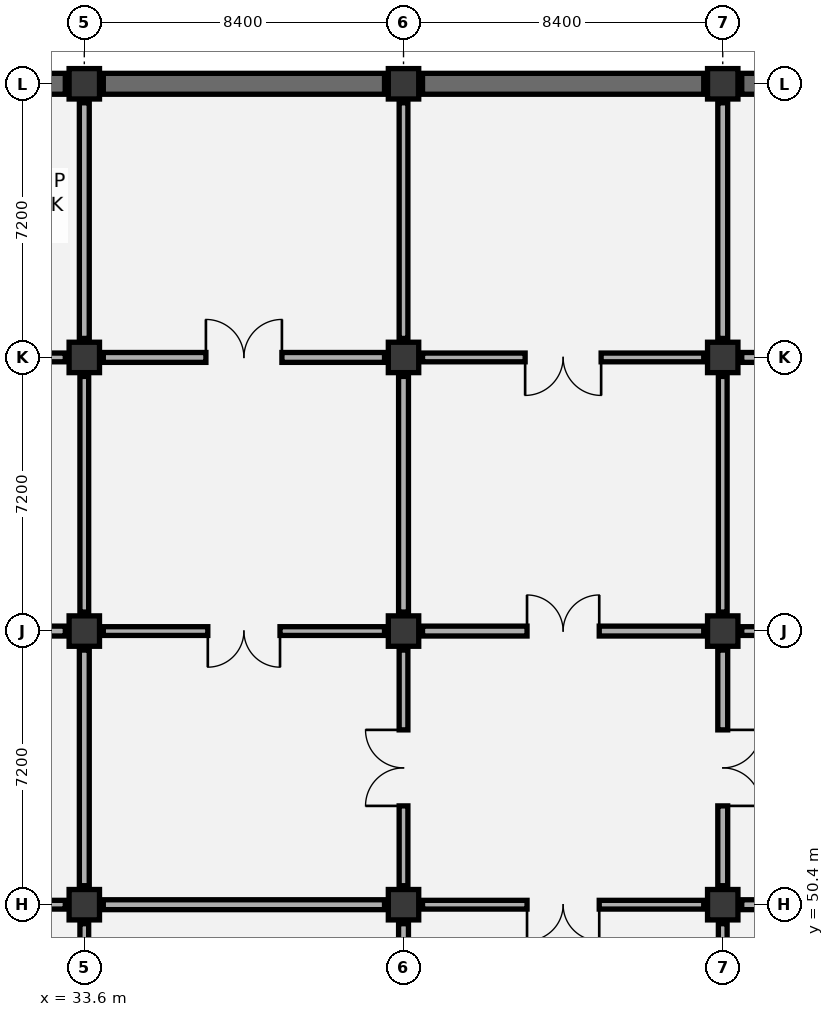
"""IFC4 building model, lengths in metres.
Left out: names, types, materials, properties, quantities, classifications, styles, units other than length and angle.
Written with IfcOpenShell. Run it as: python <this file> out.ifc"""

import sys

from ifc_helpers import new_model, si_unit, direction, frame, frame_2d, origin, origin_2d, place, context, subcontext, project, spatial, rectangle, extrude, element, fill, save


model = new_model("IFC4")
c1 = context("Model", 3, precision=1e-05, world=origin(), true_north=direction((0.0, 1.0)))
c2 = subcontext(c1, "Body", "Model", "MODEL_VIEW")
j1 = project(units=[si_unit("LENGTHUNIT", "METRE"), si_unit("PLANEANGLEUNIT", "RADIAN")], contexts=[c1])
p1 = place(None, origin())
s1 = spatial("IfcSite", under=j1, at=p1, CompositionType="ELEMENT")
p2 = place(p1, origin())
s2 = spatial("IfcBuilding", under=s1, at=p2, CompositionType="ELEMENT")
p3 = place(p2, frame((0.0, 0.0, -9.6)))
s3 = spatial("IfcBuildingStorey", under=s2, at=p3, CompositionType="ELEMENT", Elevation=-9.6)
for number, where, z_axis, x_axis in (
    (1, (33.6, 50.4, 0.0), (0.0, 0.0, 1.0), (1.0, 0.0, 0.0)),
    (2, (33.6, 57.6, 0.0), (0.0, 0.0, 1.0), (1.0, 0.0, 0.0)),
    (3, (33.6, 64.8, 0.0), (0.0, 0.0, 1.0), (1.0, 0.0, 0.0)),
    (4, (33.6, 72.0, 0.0), (0.0, 0.0, 1.0), (1.0, 0.0, 0.0)),
    (5, (42.0, 50.4, 0.0), (0.0, 0.0, 1.0), (1.0, 0.0, 0.0)),
    (6, (42.0, 57.6, 0.0), (0.0, 0.0, 1.0), (1.0, 0.0, 0.0)),
    (7, (42.0, 64.8, 0.0), (0.0, 0.0, 1.0), (1.0, 0.0, 0.0)),
    (8, (42.0, 72.0, 0.0), (0.0, 0.0, 1.0), (1.0, 0.0, 0.0)),
    (9, (50.4, 50.4, 0.0), (0.0, 0.0, 1.0), (1.0, 0.0, 0.0)),
    (10, (50.4, 57.6, 0.0), (0.0, 0.0, 1.0), (1.0, 0.0, 0.0)),
    (11, (50.4, 64.8, 0.0), (0.0, 0.0, 1.0), (1.0, 0.0, 0.0)),
    (12, (50.4, 72.0, 0.0), (0.0, 0.0, 1.0), (1.0, 0.0, 0.0)),
):
    element("IfcColumn", number, at=place(p3, frame(where, z_axis=z_axis, x_axis=x_axis)), inside=s3, PredefinedType="COLUMN", context=c2, shape_type="SweptSolid", body=[
        extrude(rectangle(XDim=0.8, YDim=0.8, at=origin_2d()), origin(), (0.0, 0.0, 1.0), 4.8),
    ])
p4 = place(p3, frame((25.7, 72.0, 0.0), z_axis=(0.0, 0.0, 1.0), x_axis=(1.0, 0.0, 0.0)))
e13 = element("IfcWall", 13, at=p4, inside=s3, PredefinedType="USERDEFINED", context=c2, shape_type="SweptSolid", body=[
    extrude(rectangle(XDim=7.4, YDim=0.55, at=frame_2d((3.7, 0.0))), origin(), (0.0, 0.0, 1.0), 4.4),
])
for number, where, z_axis, x_axis in (
    (14, (34.1, 72.0, 0.0), (0.0, 0.0, 1.0), (1.0, 0.0, 0.0)),
    (15, (42.5, 72.0, 0.0), (0.0, 0.0, 1.0), (1.0, 0.0, 0.0)),
):
    element("IfcWall", number, at=place(p3, frame(where, z_axis=z_axis, x_axis=x_axis)), inside=s3, PredefinedType="USERDEFINED", context=c2, shape_type="SweptSolid", body=[
        extrude(rectangle(XDim=7.4, YDim=0.55, at=frame_2d((3.7, 0.0))), origin(), (0.0, 0.0, 1.0), 4.4),
    ])
p5 = place(p3, frame((50.9, 72.0, 0.0), z_axis=(0.0, 0.0, 1.0), x_axis=(1.0, 0.0, 0.0)))
e16 = element("IfcWall", 16, at=p5, inside=s3, PredefinedType="USERDEFINED", context=c2, shape_type="SweptSolid", body=[
    extrude(rectangle(XDim=7.4, YDim=0.55, at=frame_2d((3.7, 0.0))), origin(), (0.0, 0.0, 1.0), 4.4),
])
p6 = place(p3, frame((33.6, 43.7, 0.0), z_axis=(0.0, 0.0, 1.0), x_axis=(0.0, 1.0, 0.0)))
e17 = element("IfcWall", 17, at=p6, inside=s3, PredefinedType="PARTITIONING", context=c2, shape_type="SweptSolid", body=[
    extrude(rectangle(XDim=6.2, YDim=0.23, at=frame_2d((3.1, 0.0))), origin(), (0.0, 0.0, 1.0), 3.595),
])
p7 = place(p3, frame((25.7, 50.4, 0.0), z_axis=(0.0, 0.0, 1.0), x_axis=(1.0, 0.0, 0.0)))
e18 = element("IfcWall", 18, at=p7, inside=s3, PredefinedType="PARTITIONING", context=c2, shape_type="SweptSolid", body=[
    extrude(rectangle(XDim=7.4, YDim=0.23, at=frame_2d((3.7, 0.0))), origin(), (0.0, 0.0, 1.0), 3.495),
])
p8 = place(p7, frame((2.7, 0.0, 0.0)))
e19 = element("IfcOpeningElement", 19, at=p8, cuts=e18, PredefinedType="OPENING", context=c2, shape_type="SweptSolid", body=[
    extrude(rectangle(XDim=2.0, YDim=2.35, at=frame_2d((1.0, 1.175))), frame((0.0, 0.125, 0.0), z_axis=(0.0, -1.0, 0.0), x_axis=(1.0, 0.0, 0.0)), (0.0, 0.0, 1.0), 0.25),
])
p9 = place(p3, frame((33.6, 50.9, 0.0), z_axis=(0.0, 0.0, 1.0), x_axis=(0.0, 1.0, 0.0)))
e20 = element("IfcWall", 20, at=p9, inside=s3, PredefinedType="PARTITIONING", context=c2, shape_type="SweptSolid", body=[
    extrude(rectangle(XDim=6.2, YDim=0.26, at=frame_2d((3.1, 0.0))), origin(), (0.0, 0.0, 1.0), 3.595),
])
p10 = place(p3, frame((25.7, 57.6, 0.0), z_axis=(0.0, 0.0, 1.0), x_axis=(1.0, 0.0, 0.0)))
e21 = element("IfcWall", 21, at=p10, inside=s3, PredefinedType="PARTITIONING", context=c2, shape_type="SweptSolid", body=[
    extrude(rectangle(XDim=7.4, YDim=0.26, at=frame_2d((3.7, 0.0))), origin(), (0.0, 0.0, 1.0), 3.495),
])
p11 = place(p10, frame((2.75, 0.0, 0.0)))
e22 = element("IfcOpeningElement", 22, at=p11, cuts=e21, PredefinedType="OPENING", context=c2, shape_type="SweptSolid", body=[
    extrude(rectangle(XDim=1.9, YDim=2.3, at=frame_2d((0.95, 1.15))), frame((0.0, 0.14, 0.0), z_axis=(0.0, -1.0, 0.0), x_axis=(1.0, 0.0, 0.0)), (0.0, 0.0, 1.0), 0.28),
])
p12 = place(p3, frame((33.6, 58.1, 0.0), z_axis=(0.0, 0.0, 1.0), x_axis=(0.0, 1.0, 0.0)))
e23 = element("IfcWall", 23, at=p12, inside=s3, PredefinedType="PARTITIONING", context=c2, shape_type="SweptSolid", body=[
    extrude(rectangle(XDim=6.2, YDim=0.23, at=frame_2d((3.1, 0.0))), origin(), (0.0, 0.0, 1.0), 3.595),
])
p13 = place(p3, frame((25.7, 64.8, 0.0), z_axis=(0.0, 0.0, 1.0), x_axis=(1.0, 0.0, 0.0)))
e24 = element("IfcWall", 24, at=p13, inside=s3, PredefinedType="PARTITIONING", context=c2, shape_type="SweptSolid", body=[
    extrude(rectangle(XDim=7.4, YDim=0.23, at=frame_2d((3.7, 0.0))), origin(), (0.0, 0.0, 1.0), 3.495),
])
p14 = place(p13, frame((2.7, 0.0, 0.0)))
e25 = element("IfcOpeningElement", 25, at=p14, cuts=e24, PredefinedType="OPENING", context=c2, shape_type="SweptSolid", body=[
    extrude(rectangle(XDim=2.0, YDim=2.35, at=frame_2d((1.0, 1.175))), frame((0.0, 0.125, 0.0), z_axis=(0.0, -1.0, 0.0), x_axis=(1.0, 0.0, 0.0)), (0.0, 0.0, 1.0), 0.25),
])
for number, where, z_axis, x_axis in (
    (26, (33.6, 65.3, 0.0), (0.0, 0.0, 1.0), (0.0, 1.0, 0.0)),
    (27, (42.0, 43.7, 0.0), (0.0, 0.0, 1.0), (0.0, 1.0, 0.0)),
):
    element("IfcWall", number, at=place(p3, frame(where, z_axis=z_axis, x_axis=x_axis)), inside=s3, PredefinedType="PARTITIONING", context=c2, shape_type="SweptSolid", body=[
        extrude(rectangle(XDim=6.2, YDim=0.26, at=frame_2d((3.1, 0.0))), origin(), (0.0, 0.0, 1.0), 3.595),
    ])
p15 = place(p3, frame((34.1, 50.4, 0.0), z_axis=(0.0, 0.0, 1.0), x_axis=(1.0, 0.0, 0.0)))
e28 = element("IfcWall", 28, at=p15, inside=s3, PredefinedType="PARTITIONING", context=c2, shape_type="SweptSolid", body=[
    extrude(rectangle(XDim=7.4, YDim=0.26, at=frame_2d((3.7, 0.0))), origin(), (0.0, 0.0, 1.0), 3.495),
])
p16 = place(p3, frame((42.0, 50.9, 0.0), z_axis=(0.0, 0.0, 1.0), x_axis=(0.0, 1.0, 0.0)))
e29 = element("IfcWall", 29, at=p16, inside=s3, PredefinedType="PARTITIONING", context=c2, shape_type="SweptSolid", body=[
    extrude(rectangle(XDim=6.2, YDim=0.23, at=frame_2d((3.1, 0.0))), origin(), (0.0, 0.0, 1.0), 3.595),
])
p17 = place(p16, frame((2.1, 0.0, 0.0)))
e30 = element("IfcOpeningElement", 30, at=p17, cuts=e29, PredefinedType="OPENING", context=c2, shape_type="SweptSolid", body=[
    extrude(rectangle(XDim=2.0, YDim=2.35, at=frame_2d((1.0, 1.175))), frame((0.0, 0.125, 0.0), z_axis=(0.0, -1.0, 0.0), x_axis=(1.0, 0.0, 0.0)), (0.0, 0.0, 1.0), 0.25),
])
p18 = place(p3, frame((34.1, 57.6, 0.0), z_axis=(0.0, 0.0, 1.0), x_axis=(1.0, 0.0, 0.0)))
e31 = element("IfcWall", 31, at=p18, inside=s3, PredefinedType="PARTITIONING", context=c2, shape_type="SweptSolid", body=[
    extrude(rectangle(XDim=7.4, YDim=0.23, at=frame_2d((3.7, 0.0))), origin(), (0.0, 0.0, 1.0), 3.495),
])
p19 = place(p18, frame((2.75, 0.0, 0.0)))
e32 = element("IfcOpeningElement", 32, at=p19, cuts=e31, PredefinedType="OPENING", context=c2, shape_type="SweptSolid", body=[
    extrude(rectangle(XDim=1.9, YDim=2.3, at=frame_2d((0.95, 1.15))), frame((0.0, 0.125, 0.0), z_axis=(0.0, -1.0, 0.0), x_axis=(1.0, 0.0, 0.0)), (0.0, 0.0, 1.0), 0.25),
])
p20 = place(p3, frame((42.0, 58.1, 0.0), z_axis=(0.0, 0.0, 1.0), x_axis=(0.0, 1.0, 0.0)))
e33 = element("IfcWall", 33, at=p20, inside=s3, PredefinedType="PARTITIONING", context=c2, shape_type="SweptSolid", body=[
    extrude(rectangle(XDim=6.2, YDim=0.26, at=frame_2d((3.1, 0.0))), origin(), (0.0, 0.0, 1.0), 3.595),
])
p21 = place(p3, frame((34.1, 64.8, 0.0), z_axis=(0.0, 0.0, 1.0), x_axis=(1.0, 0.0, 0.0)))
e34 = element("IfcWall", 34, at=p21, inside=s3, PredefinedType="PARTITIONING", context=c2, shape_type="SweptSolid", body=[
    extrude(rectangle(XDim=7.4, YDim=0.26, at=frame_2d((3.7, 0.0))), origin(), (0.0, 0.0, 1.0), 3.495),
])
p22 = place(p21, frame((2.7, 0.0, 0.0)))
e35 = element("IfcOpeningElement", 35, at=p22, cuts=e34, PredefinedType="OPENING", context=c2, shape_type="SweptSolid", body=[
    extrude(rectangle(XDim=2.0, YDim=2.35, at=frame_2d((1.0, 1.175))), frame((0.0, 0.14, 0.0), z_axis=(0.0, -1.0, 0.0), x_axis=(1.0, 0.0, 0.0)), (0.0, 0.0, 1.0), 0.28),
])
for number, where, z_axis, x_axis in (
    (36, (42.0, 65.3, 0.0), (0.0, 0.0, 1.0), (0.0, 1.0, 0.0)),
    (37, (50.4, 43.7, 0.0), (0.0, 0.0, 1.0), (0.0, 1.0, 0.0)),
):
    element("IfcWall", number, at=place(p3, frame(where, z_axis=z_axis, x_axis=x_axis)), inside=s3, PredefinedType="PARTITIONING", context=c2, shape_type="SweptSolid", body=[
        extrude(rectangle(XDim=6.2, YDim=0.23, at=frame_2d((3.1, 0.0))), origin(), (0.0, 0.0, 1.0), 3.595),
    ])
p23 = place(p3, frame((42.5, 50.4, 0.0), z_axis=(0.0, 0.0, 1.0), x_axis=(1.0, 0.0, 0.0)))
e38 = element("IfcWall", 38, at=p23, inside=s3, PredefinedType="PARTITIONING", context=c2, shape_type="SweptSolid", body=[
    extrude(rectangle(XDim=7.4, YDim=0.23, at=frame_2d((3.7, 0.0))), origin(), (0.0, 0.0, 1.0), 3.495),
])
p24 = place(p23, frame((2.75, 0.0, 0.0)))
e39 = element("IfcOpeningElement", 39, at=p24, cuts=e38, PredefinedType="OPENING", context=c2, shape_type="SweptSolid", body=[
    extrude(rectangle(XDim=1.9, YDim=2.3, at=frame_2d((0.95, 1.15))), frame((0.0, 0.125, 0.0), z_axis=(0.0, -1.0, 0.0), x_axis=(1.0, 0.0, 0.0)), (0.0, 0.0, 1.0), 0.25),
])
p25 = place(p3, frame((50.4, 50.9, 0.0), z_axis=(0.0, 0.0, 1.0), x_axis=(0.0, 1.0, 0.0)))
e40 = element("IfcWall", 40, at=p25, inside=s3, PredefinedType="PARTITIONING", context=c2, shape_type="SweptSolid", body=[
    extrude(rectangle(XDim=6.2, YDim=0.26, at=frame_2d((3.1, 0.0))), origin(), (0.0, 0.0, 1.0), 3.595),
])
p26 = place(p25, frame((2.1, 0.0, 0.0)))
e41 = element("IfcOpeningElement", 41, at=p26, cuts=e40, PredefinedType="OPENING", context=c2, shape_type="SweptSolid", body=[
    extrude(rectangle(XDim=2.0, YDim=2.35, at=frame_2d((1.0, 1.175))), frame((0.0, 0.14, 0.0), z_axis=(0.0, -1.0, 0.0), x_axis=(1.0, 0.0, 0.0)), (0.0, 0.0, 1.0), 0.28),
])
p27 = place(p3, frame((42.5, 57.6, 0.0), z_axis=(0.0, 0.0, 1.0), x_axis=(1.0, 0.0, 0.0)))
e42 = element("IfcWall", 42, at=p27, inside=s3, PredefinedType="PARTITIONING", context=c2, shape_type="SweptSolid", body=[
    extrude(rectangle(XDim=7.4, YDim=0.26, at=frame_2d((3.7, 0.0))), origin(), (0.0, 0.0, 1.0), 3.495),
])
p28 = place(p27, frame((2.75, 0.0, 0.0)))
e43 = element("IfcOpeningElement", 43, at=p28, cuts=e42, PredefinedType="OPENING", context=c2, shape_type="SweptSolid", body=[
    extrude(rectangle(XDim=1.9, YDim=2.3, at=frame_2d((0.95, 1.15))), frame((0.0, 0.14, 0.0), z_axis=(0.0, -1.0, 0.0), x_axis=(1.0, 0.0, 0.0)), (0.0, 0.0, 1.0), 0.28),
])
p29 = place(p3, frame((50.4, 58.1, 0.0), z_axis=(0.0, 0.0, 1.0), x_axis=(0.0, 1.0, 0.0)))
e44 = element("IfcWall", 44, at=p29, inside=s3, PredefinedType="PARTITIONING", context=c2, shape_type="SweptSolid", body=[
    extrude(rectangle(XDim=6.2, YDim=0.23, at=frame_2d((3.1, 0.0))), origin(), (0.0, 0.0, 1.0), 3.595),
])
p30 = place(p3, frame((42.5, 64.8, 0.0), z_axis=(0.0, 0.0, 1.0), x_axis=(1.0, 0.0, 0.0)))
e45 = element("IfcWall", 45, at=p30, inside=s3, PredefinedType="PARTITIONING", context=c2, shape_type="SweptSolid", body=[
    extrude(rectangle(XDim=7.4, YDim=0.23, at=frame_2d((3.7, 0.0))), origin(), (0.0, 0.0, 1.0), 3.495),
])
p31 = place(p30, frame((2.7, 0.0, 0.0)))
e46 = element("IfcOpeningElement", 46, at=p31, cuts=e45, PredefinedType="OPENING", context=c2, shape_type="SweptSolid", body=[
    extrude(rectangle(XDim=2.0, YDim=2.35, at=frame_2d((1.0, 1.175))), frame((0.0, 0.125, 0.0), z_axis=(0.0, -1.0, 0.0), x_axis=(1.0, 0.0, 0.0)), (0.0, 0.0, 1.0), 0.25),
])
p32 = place(p3, frame((50.4, 65.3, 0.0), z_axis=(0.0, 0.0, 1.0), x_axis=(0.0, 1.0, 0.0)))
e47 = element("IfcWall", 47, at=p32, inside=s3, PredefinedType="PARTITIONING", context=c2, shape_type="SweptSolid", body=[
    extrude(rectangle(XDim=6.2, YDim=0.26, at=frame_2d((3.1, 0.0))), origin(), (0.0, 0.0, 1.0), 3.595),
])
p33 = place(p3, frame((50.9, 50.4, 0.0), z_axis=(0.0, 0.0, 1.0), x_axis=(1.0, 0.0, 0.0)))
e48 = element("IfcWall", 48, at=p33, inside=s3, PredefinedType="PARTITIONING", context=c2, shape_type="SweptSolid", body=[
    extrude(rectangle(XDim=7.4, YDim=0.26, at=frame_2d((3.7, 0.0))), origin(), (0.0, 0.0, 1.0), 3.495),
])
p34 = place(p33, frame((2.75, 0.0, 0.0)))
e49 = element("IfcOpeningElement", 49, at=p34, cuts=e48, PredefinedType="OPENING", context=c2, shape_type="SweptSolid", body=[
    extrude(rectangle(XDim=1.9, YDim=2.3, at=frame_2d((0.95, 1.15))), frame((0.0, 0.14, 0.0), z_axis=(0.0, -1.0, 0.0), x_axis=(1.0, 0.0, 0.0)), (0.0, 0.0, 1.0), 0.28),
])
p35 = place(p3, frame((50.9, 57.6, 0.0), z_axis=(0.0, 0.0, 1.0), x_axis=(1.0, 0.0, 0.0)))
e50 = element("IfcWall", 50, at=p35, inside=s3, PredefinedType="PARTITIONING", context=c2, shape_type="SweptSolid", body=[
    extrude(rectangle(XDim=7.4, YDim=0.23, at=frame_2d((3.7, 0.0))), origin(), (0.0, 0.0, 1.0), 3.495),
])
p36 = place(p35, frame((2.75, 0.0, 0.0)))
e51 = element("IfcOpeningElement", 51, at=p36, cuts=e50, PredefinedType="OPENING", context=c2, shape_type="SweptSolid", body=[
    extrude(rectangle(XDim=1.9, YDim=2.3, at=frame_2d((0.95, 1.15))), frame((0.0, 0.125, 0.0), z_axis=(0.0, -1.0, 0.0), x_axis=(1.0, 0.0, 0.0)), (0.0, 0.0, 1.0), 0.25),
])
p37 = place(p3, frame((50.9, 64.8, 0.0), z_axis=(0.0, 0.0, 1.0), x_axis=(1.0, 0.0, 0.0)))
e52 = element("IfcWall", 52, at=p37, inside=s3, PredefinedType="PARTITIONING", context=c2, shape_type="SweptSolid", body=[
    extrude(rectangle(XDim=7.4, YDim=0.26, at=frame_2d((3.7, 0.0))), origin(), (0.0, 0.0, 1.0), 3.495),
])
p38 = place(p37, frame((2.7, 0.0, 0.0)))
e53 = element("IfcOpeningElement", 53, at=p38, cuts=e52, PredefinedType="OPENING", context=c2, shape_type="SweptSolid", body=[
    extrude(rectangle(XDim=2.0, YDim=2.35, at=frame_2d((1.0, 1.175))), frame((0.0, 0.14, 0.0), z_axis=(0.0, -1.0, 0.0), x_axis=(1.0, 0.0, 0.0)), (0.0, 0.0, 1.0), 0.28),
])
p39 = place(p17, origin())
e54 = element("IfcDoor", 54, at=p39, inside=s3, OperationType="DOUBLE_DOOR_SINGLE_SWING", PredefinedType="DOOR", context=c2, shape_type="SweptSolid", body=[
    extrude(rectangle(XDim=2.0, YDim=2.35, at=frame_2d((1.0, 1.175))), frame((0.0, 0.025, 0.0), z_axis=(0.0, -1.0, 0.0), x_axis=(1.0, 0.0, 0.0)), (0.0, 0.0, 1.0), 0.05),
])
fill(e30, e54)
p40 = place(p19, frame((1.9, 0.0, 0.0), z_axis=(0.0, 0.0, 1.0), x_axis=(-1.0, 0.0, 0.0)))
e55 = element("IfcDoor", 55, at=p40, inside=s3, OperationType="DOUBLE_DOOR_SINGLE_SWING", PredefinedType="DOOR", context=c2, shape_type="SweptSolid", body=[
    extrude(rectangle(XDim=1.9, YDim=2.3, at=frame_2d((0.95, 1.15))), frame((0.0, 0.025, 0.0), z_axis=(0.0, -1.0, 0.0), x_axis=(1.0, 0.0, 0.0)), (0.0, 0.0, 1.0), 0.05),
])
fill(e32, e55)
p41 = place(p22, origin())
e56 = element("IfcDoor", 56, at=p41, inside=s3, OperationType="DOUBLE_DOOR_SINGLE_SWING", PredefinedType="DOOR", context=c2, shape_type="SweptSolid", body=[
    extrude(rectangle(XDim=2.0, YDim=2.35, at=frame_2d((1.0, 1.175))), frame((0.0, 0.025, 0.0), z_axis=(0.0, -1.0, 0.0), x_axis=(1.0, 0.0, 0.0)), (0.0, 0.0, 1.0), 0.05),
])
fill(e35, e56)
p42 = place(p24, frame((1.9, 0.0, 0.0), z_axis=(0.0, 0.0, 1.0), x_axis=(-1.0, 0.0, 0.0)))
e57 = element("IfcDoor", 57, at=p42, inside=s3, OperationType="DOUBLE_DOOR_SINGLE_SWING", PredefinedType="DOOR", context=c2, shape_type="SweptSolid", body=[
    extrude(rectangle(XDim=1.9, YDim=2.3, at=frame_2d((0.95, 1.15))), frame((0.0, 0.025, 0.0), z_axis=(0.0, -1.0, 0.0), x_axis=(1.0, 0.0, 0.0)), (0.0, 0.0, 1.0), 0.05),
])
fill(e39, e57)
p43 = place(p26, frame((2.0, 0.0, 0.0), z_axis=(0.0, 0.0, 1.0), x_axis=(-1.0, 0.0, 0.0)))
e58 = element("IfcDoor", 58, at=p43, inside=s3, OperationType="DOUBLE_DOOR_SINGLE_SWING", PredefinedType="DOOR", context=c2, shape_type="SweptSolid", body=[
    extrude(rectangle(XDim=2.0, YDim=2.35, at=frame_2d((1.0, 1.175))), frame((0.0, 0.025, 0.0), z_axis=(0.0, -1.0, 0.0), x_axis=(1.0, 0.0, 0.0)), (0.0, 0.0, 1.0), 0.05),
])
fill(e41, e58)
p44 = place(p28, origin())
e59 = element("IfcDoor", 59, at=p44, inside=s3, OperationType="DOUBLE_DOOR_SINGLE_SWING", PredefinedType="DOOR", context=c2, shape_type="SweptSolid", body=[
    extrude(rectangle(XDim=1.9, YDim=2.3, at=frame_2d((0.95, 1.15))), frame((0.0, 0.025, 0.0), z_axis=(0.0, -1.0, 0.0), x_axis=(1.0, 0.0, 0.0)), (0.0, 0.0, 1.0), 0.05),
])
fill(e43, e59)
p45 = place(p31, frame((2.0, 0.0, 0.0), z_axis=(0.0, 0.0, 1.0), x_axis=(-1.0, 0.0, 0.0)))
e60 = element("IfcDoor", 60, at=p45, inside=s3, OperationType="DOUBLE_DOOR_SINGLE_SWING", PredefinedType="DOOR", context=c2, shape_type="SweptSolid", body=[
    extrude(rectangle(XDim=2.0, YDim=2.35, at=frame_2d((1.0, 1.175))), frame((0.0, 0.025, 0.0), z_axis=(0.0, -1.0, 0.0), x_axis=(1.0, 0.0, 0.0)), (0.0, 0.0, 1.0), 0.05),
])
fill(e46, e60)
save(model, sys.argv[1])
